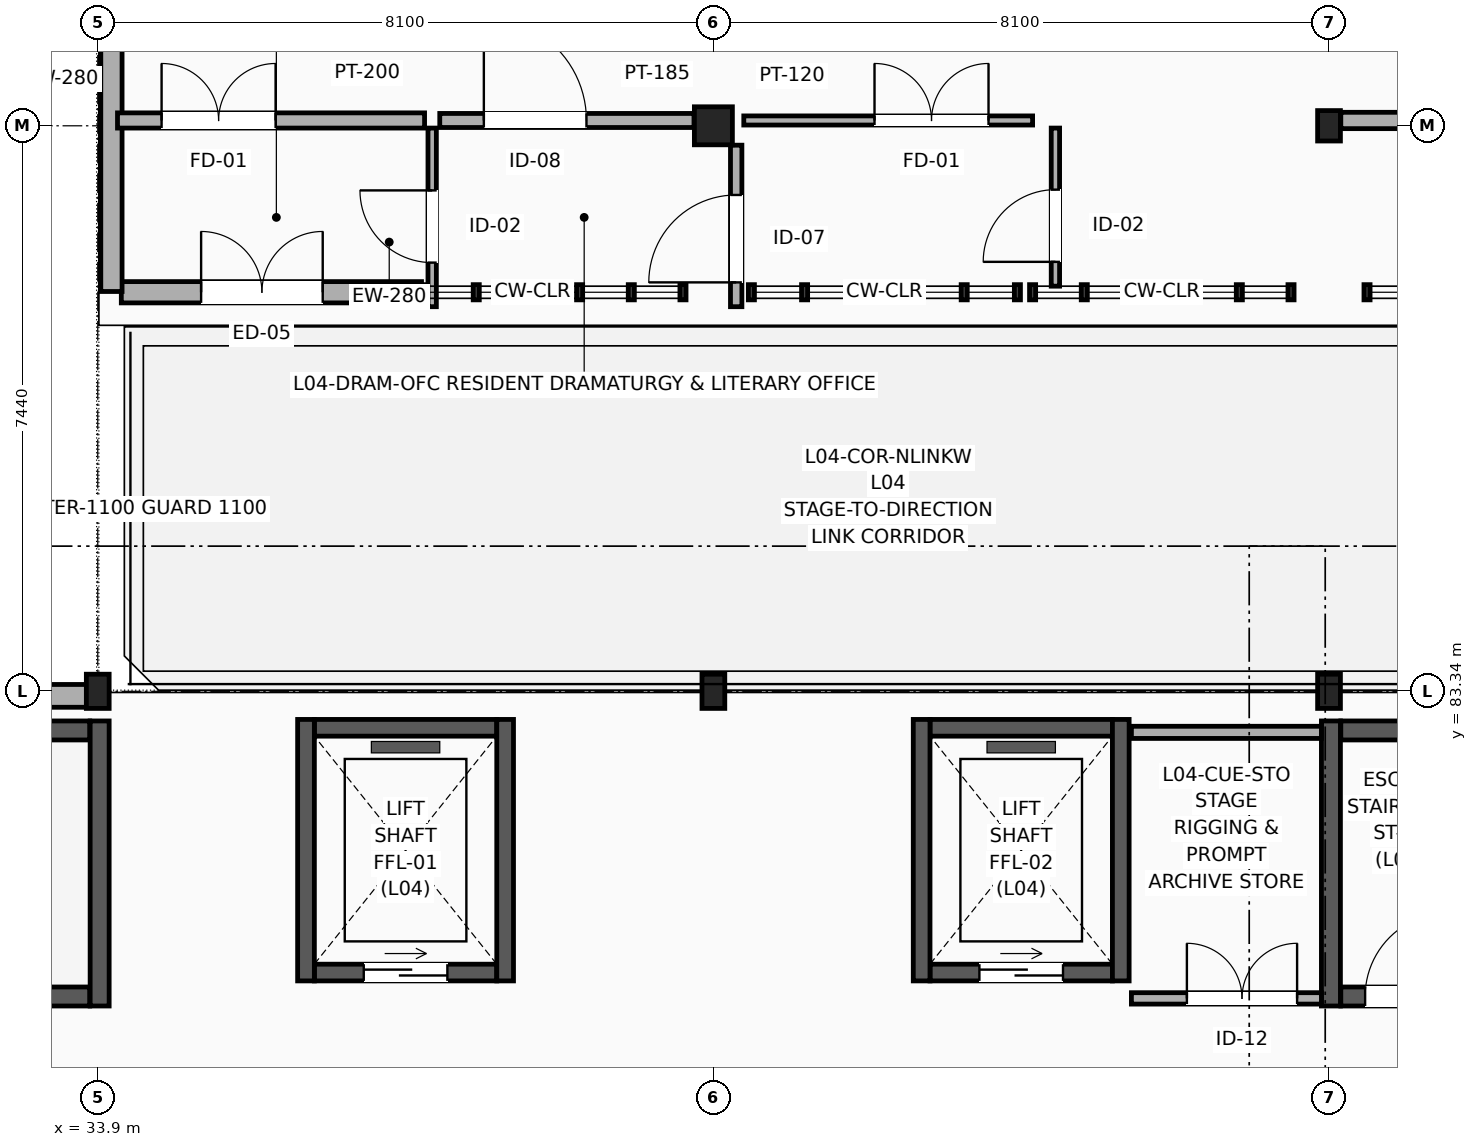
"""IFC4 building model, lengths in metres.
Left out: names, types, materials, properties, quantities, classifications, styles, units other than length and angle.
Written with IfcOpenShell. Run it as: python <this file> out.ifc"""

import sys

from ifc_helpers import new_model, si_unit, direction, frame, frame_2d, origin, origin_2d, place, context, subcontext, project, spatial, rectangle, i_section, extrude, element, fill, save


model = new_model("IFC4")
c1 = context("Model", 3, precision=1e-05, world=origin(), true_north=direction((0.0, 1.0)))
c2 = subcontext(c1, "Body", "Model", "MODEL_VIEW")
j1 = project(units=[si_unit("LENGTHUNIT", "METRE"), si_unit("PLANEANGLEUNIT", "RADIAN")], contexts=[c1])
p1 = place(None, origin())
s1 = spatial("IfcSite", under=j1, at=p1, CompositionType="ELEMENT")
p2 = place(p1, origin())
s2 = spatial("IfcBuilding", under=s1, at=p2, CompositionType="ELEMENT")
p3 = place(p2, frame((0.0, 0.0, 19.2)))
s3 = spatial("IfcBuildingStorey", under=s2, at=p3, CompositionType="ELEMENT", Elevation=19.2)
for number, where, z_axis, x_axis in (
    (1, (33.9, 83.34, 0.0), (0.0, 0.0, 1.0), (1.0, 0.0, 0.0)),
    (2, (42.0, 83.34, 0.0), (0.0, 0.0, 1.0), (1.0, 0.0, 0.0)),
):
    element("IfcColumn", number, at=place(p3, frame(where, z_axis=z_axis, x_axis=x_axis)), inside=s3, PredefinedType="COLUMN", context=c2, shape_type="SweptSolid", body=[
        extrude(i_section(OverallWidth=0.3, OverallDepth=0.45, WebThickness=0.014, FlangeThickness=0.026, FilletRadius=0.027, at=origin_2d()), origin(), (0.0, 0.0, 1.0), 4.2),
    ])
p4 = place(p3, frame((42.0, 90.78, 0.0), z_axis=(0.0, 0.0, 1.0), x_axis=(1.0, 0.0, 0.0)))
e3 = element("IfcColumn", 3, at=p4, inside=s3, PredefinedType="COLUMN", context=c2, shape_type="SweptSolid", body=[
    extrude(rectangle(XDim=0.5, YDim=0.5, at=origin_2d()), origin(), (0.0, 0.0, 1.0), 4.2),
])
p5 = place(p3, frame((50.1, 83.34, 0.0), z_axis=(0.0, 0.0, 1.0), x_axis=(1.0, 0.0, 0.0)))
e4 = element("IfcColumn", 4, at=p5, inside=s3, PredefinedType="COLUMN", context=c2, shape_type="SweptSolid", body=[
    extrude(i_section(OverallWidth=0.3, OverallDepth=0.45, WebThickness=0.014, FlangeThickness=0.026, FilletRadius=0.027, at=origin_2d()), origin(), (0.0, 0.0, 1.0), 4.2),
])
p6 = place(p3, frame((50.1, 90.78, 0.0), z_axis=(0.0, 0.0, 1.0), x_axis=(1.0, 0.0, 0.0)))
e5 = element("IfcColumn", 5, at=p6, inside=s3, PredefinedType="COLUMN", context=c2, shape_type="SweptSolid", body=[
    extrude(i_section(OverallWidth=0.3, OverallDepth=0.4, WebThickness=0.013, FlangeThickness=0.024, FilletRadius=0.027, at=origin_2d()), origin(), (0.0, 0.0, 1.0), 4.2),
])
p7 = place(p3, frame((26.25, 83.28, 0.0), z_axis=(0.0, 0.0, 1.0), x_axis=(1.0, 0.0, 0.0)))
e6 = element("IfcWall", 6, at=p7, inside=s3, PredefinedType="SOLIDWALL", context=c2, shape_type="SweptSolid", body=[
    extrude(rectangle(XDim=7.55, YDim=0.3, at=frame_2d((3.775, 0.0))), origin(), (0.0, 0.0, 1.0), 3.345),
])
p8 = place(p3, frame((34.21, 88.59, 0.0), z_axis=(0.0, 0.0, 1.0), x_axis=(1.0, 0.0, 0.0)))
e7 = element("IfcWall", 7, at=p8, inside=s3, PredefinedType="SOLIDWALL", context=c2, shape_type="SweptSolid", body=[
    extrude(rectangle(XDim=3.95, YDim=0.28, at=frame_2d((1.975, 0.0))), origin(), (0.0, 0.0, 1.0), 3.945),
])
p9 = place(p8, frame((1.05, 0.0, 0.0)))
e8 = element("IfcOpeningElement", 8, at=p9, cuts=e7, PredefinedType="OPENING", context=c2, shape_type="SweptSolid", body=[
    extrude(rectangle(XDim=1.6, YDim=2.3, at=frame_2d((0.8, 1.15))), frame((0.0, 0.15, 0.0), z_axis=(0.0, -1.0, 0.0), x_axis=(1.0, 0.0, 0.0)), (0.0, 0.0, 1.0), 0.3),
])
p10 = place(p3, frame((34.08, 88.6, 0.0), z_axis=(0.0, 0.0, 1.0), x_axis=(0.0, 1.0, 0.0)))
e9 = element("IfcWall", 9, at=p10, inside=s3, PredefinedType="SOLIDWALL", context=c2, shape_type="SweptSolid", body=[
    extrude(rectangle(XDim=5.6, YDim=0.28, at=frame_2d((2.8, 0.0))), origin(), (0.0, 0.0, 1.0), 3.945),
])
p11 = place(p3, frame((26.155, 79.325, 0.0), z_axis=(0.0, 0.0, 1.0), x_axis=(1.0, 0.0, 0.0)))
e10 = element("IfcWall", 10, at=p11, inside=s3, PredefinedType="SHEAR", context=c2, shape_type="SweptSolid", body=[
    extrude(rectangle(XDim=7.64, YDim=0.25, at=frame_2d((3.82, 0.0))), origin(), (0.0, 0.0, 1.0), 3.965),
])
p12 = place(p11, frame((0.32, 0.0, 0.0)))
e11 = element("IfcOpeningElement", 11, at=p12, cuts=e10, PredefinedType="OPENING", context=c2, shape_type="SweptSolid", body=[
    extrude(rectangle(XDim=1.1, YDim=2.2, at=frame_2d((0.55, 1.1))), frame((0.0, 0.135, 0.0), z_axis=(0.0, -1.0, 0.0), x_axis=(1.0, 0.0, 0.0)), (0.0, 0.0, 1.0), 0.27),
])
p13 = place(p3, frame((26.155, 82.825, 0.0), z_axis=(0.0, 0.0, 1.0), x_axis=(1.0, 0.0, 0.0)))
e12 = element("IfcWall", 12, at=p13, inside=s3, PredefinedType="SHEAR", context=c2, shape_type="SweptSolid", body=[
    extrude(rectangle(XDim=7.64, YDim=0.25, at=frame_2d((3.82, 0.0))), origin(), (0.0, 0.0, 1.0), 3.965),
])
p14 = place(p3, frame((33.925, 79.2, 0.0), z_axis=(0.0, 0.0, 1.0), x_axis=(0.0, 1.0, 0.0)))
e13 = element("IfcWall", 13, at=p14, inside=s3, PredefinedType="SHEAR", context=c2, shape_type="SweptSolid", body=[
    extrude(rectangle(XDim=3.75, YDim=0.25, at=frame_2d((1.875, 0.0))), origin(), (0.0, 0.0, 1.0), 3.965),
])
p15 = place(p3, frame((50.255, 79.325, 0.0), z_axis=(0.0, 0.0, 1.0), x_axis=(1.0, 0.0, 0.0)))
e14 = element("IfcWall", 14, at=p15, inside=s3, PredefinedType="SHEAR", context=c2, shape_type="SweptSolid", body=[
    extrude(rectangle(XDim=7.64, YDim=0.25, at=frame_2d((3.82, 0.0))), origin(), (0.0, 0.0, 1.0), 3.965),
])
p16 = place(p15, frame((0.32, 0.0, 0.0)))
e15 = element("IfcOpeningElement", 15, at=p16, cuts=e14, PredefinedType="OPENING", context=c2, shape_type="SweptSolid", body=[
    extrude(rectangle(XDim=1.1, YDim=2.2, at=frame_2d((0.55, 1.1))), frame((0.0, 0.135, 0.0), z_axis=(0.0, -1.0, 0.0), x_axis=(1.0, 0.0, 0.0)), (0.0, 0.0, 1.0), 0.27),
])
p17 = place(p3, frame((50.255, 82.825, 0.0), z_axis=(0.0, 0.0, 1.0), x_axis=(1.0, 0.0, 0.0)))
e16 = element("IfcWall", 16, at=p17, inside=s3, PredefinedType="SHEAR", context=c2, shape_type="SweptSolid", body=[
    extrude(rectangle(XDim=7.64, YDim=0.25, at=frame_2d((3.82, 0.0))), origin(), (0.0, 0.0, 1.0), 3.965),
])
p18 = place(p3, frame((50.125, 79.2, 0.0), z_axis=(0.0, 0.0, 1.0), x_axis=(0.0, 1.0, 0.0)))
e17 = element("IfcWall", 17, at=p18, inside=s3, PredefinedType="SHEAR", context=c2, shape_type="SweptSolid", body=[
    extrude(rectangle(XDim=3.75, YDim=0.25, at=frame_2d((1.875, 0.0))), origin(), (0.0, 0.0, 1.0), 3.965),
])
p19 = place(p3, frame((36.75, 79.64, 0.0), z_axis=(0.0, 0.0, 1.0), x_axis=(1.0, 0.0, 0.0)))
e18 = element("IfcWall", 18, at=p19, inside=s3, PredefinedType="SOLIDWALL", context=c2, shape_type="SweptSolid", body=[
    extrude(rectangle(XDim=2.4, YDim=0.22, at=frame_2d((1.2, 0.0))), origin(), (0.0, 0.0, 1.0), 3.965),
])
p20 = place(p19, frame((0.65, 0.0, 0.0)))
e19 = element("IfcOpeningElement", 19, at=p20, cuts=e18, PredefinedType="OPENING", context=c2, shape_type="SweptSolid", body=[
    extrude(rectangle(XDim=1.1, YDim=2.2, at=frame_2d((0.55, 1.1))), frame((0.0, 0.12, 0.0), z_axis=(0.0, -1.0, 0.0), x_axis=(1.0, 0.0, 0.0)), (0.0, 0.0, 1.0), 0.24),
])
p21 = place(p3, frame((36.75, 82.86, 0.0), z_axis=(0.0, 0.0, 1.0), x_axis=(1.0, 0.0, 0.0)))
e20 = element("IfcWall", 20, at=p21, inside=s3, PredefinedType="SOLIDWALL", context=c2, shape_type="SweptSolid", body=[
    extrude(rectangle(XDim=2.4, YDim=0.22, at=frame_2d((1.2, 0.0))), origin(), (0.0, 0.0, 1.0), 3.965),
])
for number, where, z_axis, x_axis in (
    (21, (36.64, 79.53, 0.0), (0.0, 0.0, 1.0), (0.0, 1.0, 0.0)),
    (22, (39.26, 79.53, 0.0), (0.0, 0.0, 1.0), (0.0, 1.0, 0.0)),
):
    element("IfcWall", number, at=place(p3, frame(where, z_axis=z_axis, x_axis=x_axis)), inside=s3, PredefinedType="SOLIDWALL", context=c2, shape_type="SweptSolid", body=[
        extrude(rectangle(XDim=3.44, YDim=0.22, at=frame_2d((1.72, 0.0))), origin(), (0.0, 0.0, 1.0), 3.965),
    ])
p22 = place(p3, frame((44.85, 79.64, 0.0), z_axis=(0.0, 0.0, 1.0), x_axis=(1.0, 0.0, 0.0)))
e23 = element("IfcWall", 23, at=p22, inside=s3, PredefinedType="SOLIDWALL", context=c2, shape_type="SweptSolid", body=[
    extrude(rectangle(XDim=2.4, YDim=0.22, at=frame_2d((1.2, 0.0))), origin(), (0.0, 0.0, 1.0), 3.965),
])
p23 = place(p22, frame((0.65, 0.0, 0.0)))
e24 = element("IfcOpeningElement", 24, at=p23, cuts=e23, PredefinedType="OPENING", context=c2, shape_type="SweptSolid", body=[
    extrude(rectangle(XDim=1.1, YDim=2.2, at=frame_2d((0.55, 1.1))), frame((0.0, 0.12, 0.0), z_axis=(0.0, -1.0, 0.0), x_axis=(1.0, 0.0, 0.0)), (0.0, 0.0, 1.0), 0.24),
])
p24 = place(p3, frame((44.85, 82.86, 0.0), z_axis=(0.0, 0.0, 1.0), x_axis=(1.0, 0.0, 0.0)))
e25 = element("IfcWall", 25, at=p24, inside=s3, PredefinedType="SOLIDWALL", context=c2, shape_type="SweptSolid", body=[
    extrude(rectangle(XDim=2.4, YDim=0.22, at=frame_2d((1.2, 0.0))), origin(), (0.0, 0.0, 1.0), 3.965),
])
for number, where, z_axis, x_axis in (
    (26, (44.74, 79.53, 0.0), (0.0, 0.0, 1.0), (0.0, 1.0, 0.0)),
    (27, (47.36, 79.53, 0.0), (0.0, 0.0, 1.0), (0.0, 1.0, 0.0)),
):
    element("IfcWall", number, at=place(p3, frame(where, z_axis=z_axis, x_axis=x_axis)), inside=s3, PredefinedType="SOLIDWALL", context=c2, shape_type="SweptSolid", body=[
        extrude(rectangle(XDim=3.44, YDim=0.22, at=frame_2d((1.72, 0.0))), origin(), (0.0, 0.0, 1.0), 3.965),
    ])
p25 = place(p3, frame((47.5, 79.3, 0.0), z_axis=(0.0, 0.0, 1.0), x_axis=(1.0, 0.0, 0.0)))
e28 = element("IfcWall", 28, at=p25, inside=s3, PredefinedType="MOVABLE", context=c2, shape_type="SweptSolid", body=[
    extrude(rectangle(XDim=2.5, YDim=0.15, at=frame_2d((1.25, 0.0))), origin(), (0.0, 0.0, 1.0), 3.945),
])
p26 = place(p25, frame((0.73, 0.0, 0.0)))
e29 = element("IfcOpeningElement", 29, at=p26, cuts=e28, PredefinedType="OPENING", context=c2, shape_type="SweptSolid", body=[
    extrude(rectangle(XDim=1.45, YDim=2.3, at=frame_2d((0.725, 1.15))), frame((0.0, 0.085, 0.0), z_axis=(0.0, -1.0, 0.0), x_axis=(1.0, 0.0, 0.0)), (0.0, 0.0, 1.0), 0.17),
])
p27 = place(p3, frame((42.4, 90.85, 0.0), z_axis=(0.0, 0.0, 1.0), x_axis=(1.0, 0.0, 0.0)))
e30 = element("IfcWall", 30, at=p27, inside=s3, PredefinedType="PARTITIONING", context=c2, shape_type="SweptSolid", body=[
    extrude(rectangle(XDim=3.8, YDim=0.12, at=frame_2d((1.9, 0.0))), origin(), (0.0, 0.0, 1.0), 3.447),
])
p28 = place(p27, frame((1.72, 0.0, 0.0)))
e31 = element("IfcOpeningElement", 31, at=p28, cuts=e30, PredefinedType="OPENING", context=c2, shape_type="SweptSolid", body=[
    extrude(rectangle(XDim=1.5, YDim=2.2, at=frame_2d((0.75, 1.1))), frame((0.0, 0.07, 0.0), z_axis=(0.0, -1.0, 0.0), x_axis=(1.0, 0.0, 0.0)), (0.0, 0.0, 1.0), 0.14),
])
p29 = place(p3, frame((46.5, 88.67, 0.0), z_axis=(0.0, 0.0, 1.0), x_axis=(0.0, 1.0, 0.0)))
e32 = element("IfcWall", 32, at=p29, inside=s3, PredefinedType="PARTITIONING", context=c2, shape_type="SweptSolid", body=[
    extrude(rectangle(XDim=2.08, YDim=0.11, at=frame_2d((1.04, 0.0))), origin(), (0.0, 0.0, 1.0), 3.447),
])
p30 = place(p29, frame((0.32, 0.0, 0.0)))
e33 = element("IfcOpeningElement", 33, at=p30, cuts=e32, PredefinedType="OPENING", context=c2, shape_type="SweptSolid", body=[
    extrude(rectangle(XDim=0.95, YDim=2.15, at=frame_2d((0.475, 1.075))), frame((0.0, 0.065, 0.0), z_axis=(0.0, -1.0, 0.0), x_axis=(1.0, 0.0, 0.0)), (0.0, 0.0, 1.0), 0.13),
])
p31 = place(p3, frame((42.3, 88.4, 0.0), z_axis=(0.0, 0.0, 1.0), x_axis=(0.0, 1.0, 0.0)))
e34 = element("IfcWall", 34, at=p31, inside=s3, PredefinedType="MOVABLE", context=c2, shape_type="SweptSolid", body=[
    extrude(rectangle(XDim=2.125, YDim=0.15, at=frame_2d((1.062, 0.0))), origin(), (0.0, 0.0, 1.0), 3.945),
])
p32 = place(p31, frame((0.32, 0.0, 0.0)))
e35 = element("IfcOpeningElement", 35, at=p32, cuts=e34, PredefinedType="OPENING", context=c2, shape_type="SweptSolid", body=[
    extrude(rectangle(XDim=1.15, YDim=2.25, at=frame_2d((0.575, 1.125))), frame((0.0, 0.085, 0.0), z_axis=(0.0, -1.0, 0.0), x_axis=(1.0, 0.0, 0.0)), (0.0, 0.0, 1.0), 0.17),
])
p33 = place(p3, frame((50.255, 90.85, 0.0), z_axis=(0.0, 0.0, 1.0), x_axis=(1.0, 0.0, 0.0)))
e36 = element("IfcWall", 36, at=p33, inside=s3, PredefinedType="PARTITIONING", context=c2, shape_type="SweptSolid", body=[
    extrude(rectangle(XDim=15.755, YDim=0.215, at=frame_2d((7.877, 0.0))), origin(), (0.0, 0.0, 1.0), 3.147),
])
p34 = place(p33, frame((3.369, 0.0, 0.0)))
e37 = element("IfcOpeningElement", 37, at=p34, cuts=e36, PredefinedType="OPENING", context=c2, shape_type="SweptSolid", body=[
    extrude(rectangle(XDim=1.05, YDim=2.25, at=frame_2d((0.525, 1.125))), frame((0.0, 0.117, 0.0), z_axis=(0.0, -1.0, 0.0), x_axis=(1.0, 0.0, 0.0)), (0.0, 0.0, 1.0), 0.235),
])
p35 = place(p3, frame((34.16, 90.85, 0.0), z_axis=(0.0, 0.0, 1.0), x_axis=(1.0, 0.0, 0.0)))
e38 = element("IfcWall", 38, at=p35, inside=s3, PredefinedType="PARTITIONING", context=c2, shape_type="SweptSolid", body=[
    extrude(rectangle(XDim=4.04, YDim=0.2, at=frame_2d((2.02, 0.0))), origin(), (0.0, 0.0, 1.0), 3.945),
])
p36 = place(p35, frame((0.58, 0.0, 0.0)))
e39 = element("IfcOpeningElement", 39, at=p36, cuts=e38, PredefinedType="OPENING", context=c2, shape_type="SweptSolid", body=[
    extrude(rectangle(XDim=1.5, YDim=2.2, at=frame_2d((0.75, 1.1))), frame((0.0, 0.11, 0.0), z_axis=(0.0, -1.0, 0.0), x_axis=(1.0, 0.0, 0.0)), (0.0, 0.0, 1.0), 0.22),
])
p37 = place(p3, frame((38.4, 90.85, 0.0), z_axis=(0.0, 0.0, 1.0), x_axis=(1.0, 0.0, 0.0)))
e40 = element("IfcWall", 40, at=p37, inside=s3, PredefinedType="PARTITIONING", context=c2, shape_type="SweptSolid", body=[
    extrude(rectangle(XDim=3.345, YDim=0.185, at=frame_2d((1.673, 0.0))), origin(), (0.0, 0.0, 1.0), 3.945),
])
p38 = place(p37, frame((0.58, 0.0, 0.0)))
e41 = element("IfcOpeningElement", 41, at=p38, cuts=e40, PredefinedType="OPENING", context=c2, shape_type="SweptSolid", body=[
    extrude(rectangle(XDim=1.35, YDim=2.2, at=frame_2d((0.675, 1.1))), frame((0.0, 0.103, 0.0), z_axis=(0.0, -1.0, 0.0), x_axis=(1.0, 0.0, 0.0)), (0.0, 0.0, 1.0), 0.205),
])
p39 = place(p3, frame((38.3, 88.4, 0.0), z_axis=(0.0, 0.0, 1.0), x_axis=(0.0, 1.0, 0.0)))
e42 = element("IfcWall", 42, at=p39, inside=s3, PredefinedType="PARTITIONING", context=c2, shape_type="SweptSolid", body=[
    extrude(rectangle(XDim=2.35, YDim=0.11, at=frame_2d((1.175, 0.0))), origin(), (0.0, 0.0, 1.0), 3.945),
])
p40 = place(p39, frame((0.58, 0.0, 0.0)))
e43 = element("IfcOpeningElement", 43, at=p40, cuts=e42, PredefinedType="OPENING", context=c2, shape_type="SweptSolid", body=[
    extrude(rectangle(XDim=0.95, YDim=2.15, at=frame_2d((0.475, 1.075))), frame((0.0, 0.065, 0.0), z_axis=(0.0, -1.0, 0.0), x_axis=(1.0, 0.0, 0.0)), (0.0, 0.0, 1.0), 0.13),
])
p41 = place(p3, frame((47.5, 82.8, 0.0), z_axis=(0.0, 0.0, 1.0), x_axis=(1.0, 0.0, 0.0)))
e44 = element("IfcWall", 44, at=p41, inside=s3, PredefinedType="PARTITIONING", context=c2, shape_type="SweptSolid", body=[
    extrude(rectangle(XDim=2.5, YDim=0.16, at=frame_2d((1.25, 0.0))), origin(), (0.0, 0.0, 1.0), 3.945),
])
p42 = place(p9, origin())
e45 = element("IfcDoor", 45, at=p42, inside=s3, OperationType="DOUBLE_DOOR_SINGLE_SWING", PredefinedType="DOOR", context=c2, shape_type="SweptSolid", body=[
    extrude(rectangle(XDim=1.6, YDim=2.3, at=frame_2d((0.8, 1.15))), frame((0.0, 0.025, 0.0), z_axis=(0.0, -1.0, 0.0), x_axis=(1.0, 0.0, 0.0)), (0.0, 0.0, 1.0), 0.05),
])
fill(e8, e45)
p43 = place(p16, origin())
e46 = element("IfcDoor", 46, at=p43, inside=s3, OperationType="SINGLE_SWING_RIGHT", PredefinedType="DOOR", context=c2, shape_type="SweptSolid", body=[
    extrude(rectangle(XDim=1.1, YDim=2.2, at=frame_2d((0.55, 1.1))), frame((0.0, 0.025, 0.0), z_axis=(0.0, -1.0, 0.0), x_axis=(1.0, 0.0, 0.0)), (0.0, 0.0, 1.0), 0.05),
])
fill(e15, e46)
p44 = place(p20, origin())
e47 = element("IfcDoor", 47, at=p44, inside=s3, OperationType="SLIDING_TO_LEFT", PredefinedType="DOOR", context=c2, shape_type="SweptSolid", body=[
    extrude(rectangle(XDim=1.1, YDim=2.2, at=frame_2d((0.55, 1.1))), frame((0.0, 0.025, 0.0), z_axis=(0.0, -1.0, 0.0), x_axis=(1.0, 0.0, 0.0)), (0.0, 0.0, 1.0), 0.05),
])
fill(e19, e47)
p45 = place(p23, origin())
e48 = element("IfcDoor", 48, at=p45, inside=s3, OperationType="SLIDING_TO_LEFT", PredefinedType="DOOR", context=c2, shape_type="SweptSolid", body=[
    extrude(rectangle(XDim=1.1, YDim=2.2, at=frame_2d((0.55, 1.1))), frame((0.0, 0.025, 0.0), z_axis=(0.0, -1.0, 0.0), x_axis=(1.0, 0.0, 0.0)), (0.0, 0.0, 1.0), 0.05),
])
fill(e24, e48)
p46 = place(p26, origin())
e49 = element("IfcDoor", 49, at=p46, inside=s3, OperationType="DOUBLE_DOOR_SINGLE_SWING", PredefinedType="DOOR", context=c2, shape_type="SweptSolid", body=[
    extrude(rectangle(XDim=1.45, YDim=2.3, at=frame_2d((0.725, 1.15))), frame((0.0, 0.025, 0.0), z_axis=(0.0, -1.0, 0.0), x_axis=(1.0, 0.0, 0.0)), (0.0, 0.0, 1.0), 0.05),
])
fill(e29, e49)
p47 = place(p28, origin())
e50 = element("IfcDoor", 50, at=p47, inside=s3, OperationType="DOUBLE_DOOR_SINGLE_SWING", PredefinedType="DOOR", context=c2, shape_type="SweptSolid", body=[
    extrude(rectangle(XDim=1.5, YDim=2.2, at=frame_2d((0.75, 1.1))), frame((0.0, 0.025, 0.0), z_axis=(0.0, -1.0, 0.0), x_axis=(1.0, 0.0, 0.0)), (0.0, 0.0, 1.0), 0.05),
])
fill(e31, e50)
p48 = place(p30, origin())
e51 = element("IfcDoor", 51, at=p48, inside=s3, OperationType="SINGLE_SWING_LEFT", PredefinedType="DOOR", context=c2, shape_type="SweptSolid", body=[
    extrude(rectangle(XDim=0.95, YDim=2.15, at=frame_2d((0.475, 1.075))), frame((0.0, 0.025, 0.0), z_axis=(0.0, -1.0, 0.0), x_axis=(1.0, 0.0, 0.0)), (0.0, 0.0, 1.0), 0.05),
])
fill(e33, e51)
p49 = place(p32, origin())
e52 = element("IfcDoor", 52, at=p49, inside=s3, OperationType="SINGLE_SWING_LEFT", PredefinedType="DOOR", context=c2, shape_type="SweptSolid", body=[
    extrude(rectangle(XDim=1.15, YDim=2.25, at=frame_2d((0.575, 1.125))), frame((0.0, 0.025, 0.0), z_axis=(0.0, -1.0, 0.0), x_axis=(1.0, 0.0, 0.0)), (0.0, 0.0, 1.0), 0.05),
])
fill(e35, e52)
p50 = place(p36, origin())
e53 = element("IfcDoor", 53, at=p50, inside=s3, OperationType="DOUBLE_DOOR_SINGLE_SWING", PredefinedType="DOOR", context=c2, shape_type="SweptSolid", body=[
    extrude(rectangle(XDim=1.5, YDim=2.2, at=frame_2d((0.75, 1.1))), frame((0.0, 0.025, 0.0), z_axis=(0.0, -1.0, 0.0), x_axis=(1.0, 0.0, 0.0)), (0.0, 0.0, 1.0), 0.05),
])
fill(e39, e53)
p51 = place(p38, origin())
e54 = element("IfcDoor", 54, at=p51, inside=s3, OperationType="SINGLE_SWING_LEFT", PredefinedType="DOOR", context=c2, shape_type="SweptSolid", body=[
    extrude(rectangle(XDim=1.35, YDim=2.2, at=frame_2d((0.675, 1.1))), frame((0.0, 0.025, 0.0), z_axis=(0.0, -1.0, 0.0), x_axis=(1.0, 0.0, 0.0)), (0.0, 0.0, 1.0), 0.05),
])
fill(e41, e54)
p52 = place(p40, origin())
e55 = element("IfcDoor", 55, at=p52, inside=s3, OperationType="SINGLE_SWING_RIGHT", PredefinedType="DOOR", context=c2, shape_type="SweptSolid", body=[
    extrude(rectangle(XDim=0.95, YDim=2.15, at=frame_2d((0.475, 1.075))), frame((0.0, 0.025, 0.0), z_axis=(0.0, -1.0, 0.0), x_axis=(1.0, 0.0, 0.0)), (0.0, 0.0, 1.0), 0.05),
])
fill(e43, e55)
save(model, sys.argv[1])
